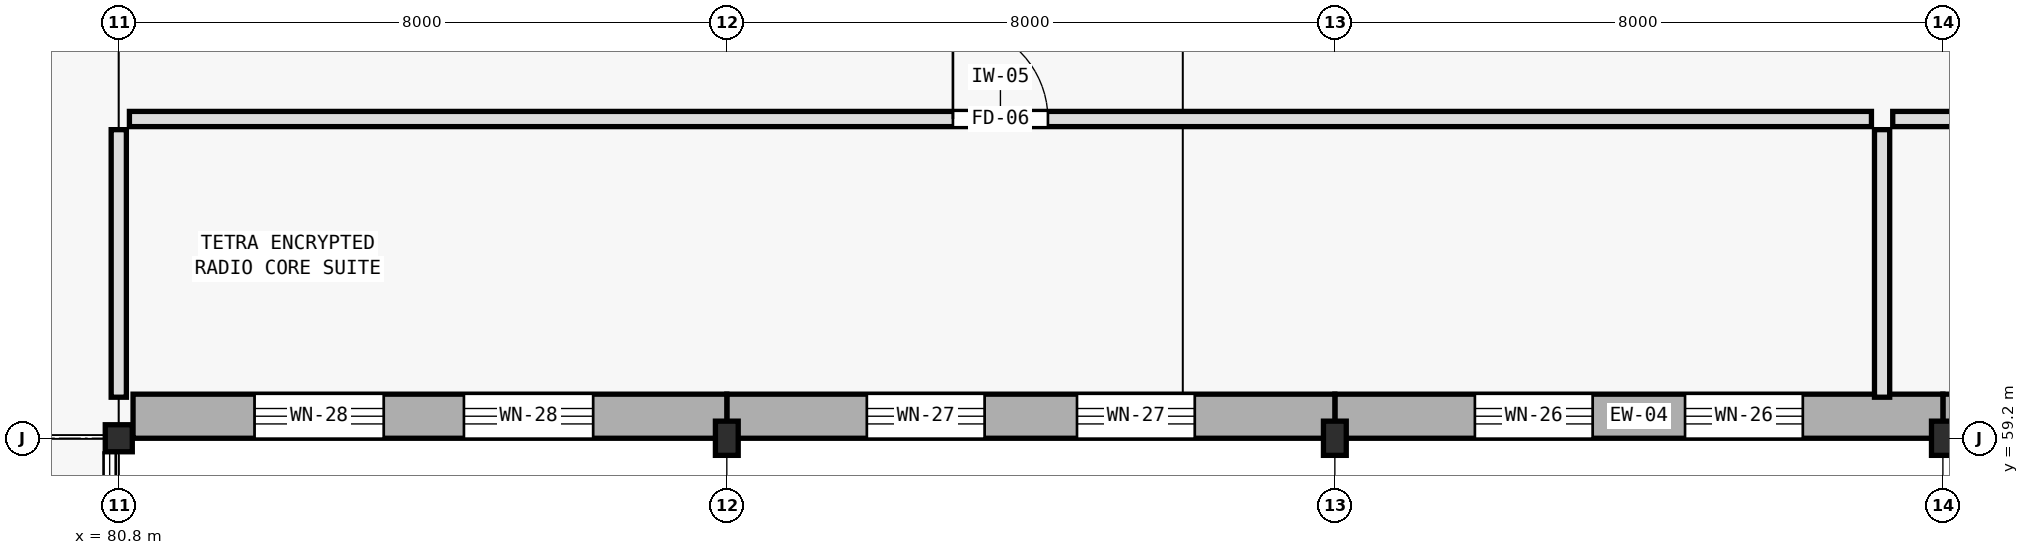
"""IFC4 building model, lengths in metres.
Left out: names, types, materials, properties, quantities, classifications, styles, units other than length and angle.
Written with IfcOpenShell. Run it as: python <this file> out.ifc"""

import sys

from ifc_helpers import new_model, si_unit, direction, frame, frame_2d, origin, origin_2d, place, context, subcontext, project, spatial, rectangle, hollow_circle, i_section, extrude, element, fill, save


model = new_model("IFC4")
c1 = context("Model", 3, precision=1e-05, world=origin(), true_north=direction((0.0, 1.0)))
c2 = subcontext(c1, "Body", "Model", "MODEL_VIEW")
j1 = project(units=[si_unit("LENGTHUNIT", "METRE"), si_unit("PLANEANGLEUNIT", "RADIAN")], contexts=[c1])
p1 = place(None, origin())
s1 = spatial("IfcSite", under=j1, at=p1, CompositionType="ELEMENT")
p2 = place(p1, origin())
s2 = spatial("IfcBuilding", under=s1, at=p2, CompositionType="ELEMENT")
p3 = place(p2, frame((0.0, 0.0, 9.9)))
s3 = spatial("IfcBuildingStorey", under=s2, at=p3, CompositionType="ELEMENT", Elevation=9.9)
p4 = place(p3, frame((80.8, 59.2, 0.0), z_axis=(0.0, 0.0, 1.0), x_axis=(1.0, 0.0, 0.0)))
e1 = element("IfcColumn", 1, at=p4, inside=s3, PredefinedType="COLUMN", context=c2, shape_type="SweptSolid", body=[
    extrude(hollow_circle(Radius=0.178, WallThickness=0.016, at=origin_2d()), origin(), (0.0, 0.0, 1.0), 4.2),
])
for number, where, z_axis, x_axis in (
    (2, (88.8, 59.2, 0.0), (0.0, 0.0, 1.0), (1.0, 0.0, 0.0)),
    (3, (96.8, 59.2, 0.0), (0.0, 0.0, 1.0), (1.0, 0.0, 0.0)),
    (4, (104.8, 59.2, 0.0), (0.0, 0.0, 1.0), (1.0, 0.0, 0.0)),
):
    element("IfcColumn", number, at=place(p3, frame(where, z_axis=z_axis, x_axis=x_axis)), inside=s3, PredefinedType="COLUMN", context=c2, shape_type="SweptSolid", body=[
        extrude(i_section(OverallWidth=0.3, OverallDepth=0.45, WebThickness=0.014, FlangeThickness=0.026, FilletRadius=0.027, at=origin_2d()), origin(), (0.0, 0.0, 1.0), 4.2),
    ])
p5 = place(p3, frame((112.8, 59.49, 0.0), z_axis=(0.0, 0.0, 1.0), x_axis=(-1.0, 0.0, 0.0)))
e5 = element("IfcWall", 5, at=p5, inside=s3, PredefinedType="STANDARD", context=c2, shape_type="SweptSolid", body=[
    extrude(rectangle(XDim=8.0, YDim=0.58, at=frame_2d((4.0, 0.0))), origin(), (0.0, 0.0, 1.0), 3.955),
])
p6 = place(p5, frame((1.917, 0.0, 0.9)))
e6 = element("IfcOpeningElement", 6, at=p6, cuts=e5, PredefinedType="OPENING", context=c2, shape_type="SweptSolid", body=[
    extrude(rectangle(XDim=1.4, YDim=2.15, at=frame_2d((0.7, 1.075))), frame((0.0, 0.3, 0.0), z_axis=(0.0, -1.0, 0.0), x_axis=(1.0, 0.0, 0.0)), (0.0, 0.0, 1.0), 0.6),
])
p7 = place(p5, frame((4.682, 0.0, 0.9)))
e7 = element("IfcOpeningElement", 7, at=p7, cuts=e5, PredefinedType="OPENING", context=c2, shape_type="SweptSolid", body=[
    extrude(rectangle(XDim=1.4, YDim=2.15, at=frame_2d((0.7, 1.075))), frame((0.0, 0.3, 0.0), z_axis=(0.0, -1.0, 0.0), x_axis=(1.0, 0.0, 0.0)), (0.0, 0.0, 1.0), 0.6),
])
p8 = place(p3, frame((104.8, 59.49, 0.0), z_axis=(0.0, 0.0, 1.0), x_axis=(-1.0, 0.0, 0.0)))
e8 = element("IfcWall", 8, at=p8, inside=s3, PredefinedType="STANDARD", context=c2, shape_type="SweptSolid", body=[
    extrude(rectangle(XDim=8.0, YDim=0.58, at=frame_2d((4.0, 0.0))), origin(), (0.0, 0.0, 1.0), 3.955),
])
p9 = place(p8, frame((1.843, 0.0, 0.9)))
e9 = element("IfcOpeningElement", 9, at=p9, cuts=e8, PredefinedType="OPENING", context=c2, shape_type="SweptSolid", body=[
    extrude(rectangle(XDim=1.55, YDim=1.85, at=frame_2d((0.775, 0.925))), frame((0.0, 0.3, 0.0), z_axis=(0.0, -1.0, 0.0), x_axis=(1.0, 0.0, 0.0)), (0.0, 0.0, 1.0), 0.6),
])
p10 = place(p8, frame((4.607, 0.0, 0.9)))
e10 = element("IfcOpeningElement", 10, at=p10, cuts=e8, PredefinedType="OPENING", context=c2, shape_type="SweptSolid", body=[
    extrude(rectangle(XDim=1.55, YDim=1.85, at=frame_2d((0.775, 0.925))), frame((0.0, 0.3, 0.0), z_axis=(0.0, -1.0, 0.0), x_axis=(1.0, 0.0, 0.0)), (0.0, 0.0, 1.0), 0.6),
])
p11 = place(p3, frame((96.8, 59.49, 0.0), z_axis=(0.0, 0.0, 1.0), x_axis=(-1.0, 0.0, 0.0)))
e11 = element("IfcWall", 11, at=p11, inside=s3, PredefinedType="STANDARD", context=c2, shape_type="SweptSolid", body=[
    extrude(rectangle(XDim=8.0, YDim=0.58, at=frame_2d((4.0, 0.0))), origin(), (0.0, 0.0, 1.0), 3.955),
])
p12 = place(p11, frame((1.843, 0.0, 0.9)))
e12 = element("IfcOpeningElement", 12, at=p12, cuts=e11, PredefinedType="OPENING", context=c2, shape_type="SweptSolid", body=[
    extrude(rectangle(XDim=1.55, YDim=2.25, at=frame_2d((0.775, 1.125))), frame((0.0, 0.3, 0.0), z_axis=(0.0, -1.0, 0.0), x_axis=(1.0, 0.0, 0.0)), (0.0, 0.0, 1.0), 0.6),
])
p13 = place(p11, frame((4.607, 0.0, 0.9)))
e13 = element("IfcOpeningElement", 13, at=p13, cuts=e11, PredefinedType="OPENING", context=c2, shape_type="SweptSolid", body=[
    extrude(rectangle(XDim=1.55, YDim=2.25, at=frame_2d((0.775, 1.125))), frame((0.0, 0.3, 0.0), z_axis=(0.0, -1.0, 0.0), x_axis=(1.0, 0.0, 0.0)), (0.0, 0.0, 1.0), 0.6),
])
p14 = place(p3, frame((88.8, 59.49, 0.0), z_axis=(0.0, 0.0, 1.0), x_axis=(-1.0, 0.0, 0.0)))
e14 = element("IfcWall", 14, at=p14, inside=s3, PredefinedType="STANDARD", context=c2, shape_type="SweptSolid", body=[
    extrude(rectangle(XDim=7.812, YDim=0.58, at=frame_2d((3.906, 0.0))), origin(), (0.0, 0.0, 1.0), 3.955),
])
p15 = place(p14, frame((1.759, 0.0, 0.9)))
e15 = element("IfcOpeningElement", 15, at=p15, cuts=e14, PredefinedType="OPENING", context=c2, shape_type="SweptSolid", body=[
    extrude(rectangle(XDim=1.7, YDim=2.0, at=frame_2d((0.85, 1.0))), frame((0.0, 0.3, 0.0), z_axis=(0.0, -1.0, 0.0), x_axis=(1.0, 0.0, 0.0)), (0.0, 0.0, 1.0), 0.6),
])
p16 = place(p14, frame((4.513, 0.0, 0.9)))
e16 = element("IfcOpeningElement", 16, at=p16, cuts=e14, PredefinedType="OPENING", context=c2, shape_type="SweptSolid", body=[
    extrude(rectangle(XDim=1.7, YDim=2.0, at=frame_2d((0.85, 1.0))), frame((0.0, 0.3, 0.0), z_axis=(0.0, -1.0, 0.0), x_axis=(1.0, 0.0, 0.0)), (0.0, 0.0, 1.0), 0.6),
])
p17 = place(p3, frame((80.94, 63.4, 0.0), z_axis=(0.0, 0.0, 1.0), x_axis=(1.0, 0.0, 0.0)))
e17 = element("IfcWall", 17, at=p17, inside=s3, PredefinedType="STANDARD", context=c2, shape_type="SweptSolid", body=[
    extrude(rectangle(XDim=22.92, YDim=0.2, at=frame_2d((11.46, 0.0))), origin(), (0.0, 0.0, 1.0), 3.41),
])
p18 = place(p17, frame((10.835, 0.0, 0.0)))
e18 = element("IfcOpeningElement", 18, at=p18, cuts=e17, PredefinedType="OPENING", context=c2, shape_type="SweptSolid", body=[
    extrude(rectangle(XDim=1.25, YDim=2.3, at=frame_2d((0.625, 1.15))), frame((0.0, 0.11, 0.0), z_axis=(0.0, -1.0, 0.0), x_axis=(1.0, 0.0, 0.0)), (0.0, 0.0, 1.0), 0.22),
])
p19 = place(p3, frame((80.8, 59.74, 0.0), z_axis=(0.0, 0.0, 1.0), x_axis=(0.0, 1.0, 0.0)))
e19 = element("IfcWall", 19, at=p19, inside=s3, PredefinedType="STANDARD", context=c2, shape_type="SweptSolid", body=[
    extrude(rectangle(XDim=3.52, YDim=0.2, at=frame_2d((1.76, 0.0))), origin(), (0.0, 0.0, 1.0), 3.41),
])
p20 = place(p3, frame((104.0, 59.74, 0.0), z_axis=(0.0, 0.0, 1.0), x_axis=(0.0, 1.0, 0.0)))
e20 = element("IfcWall", 20, at=p20, inside=s3, PredefinedType="STANDARD", context=c2, shape_type="SweptSolid", body=[
    extrude(rectangle(XDim=3.52, YDim=0.2, at=frame_2d((1.76, 0.0))), origin(), (0.0, 0.0, 1.0), 3.92),
])
p21 = place(p3, frame((104.14, 63.4, 0.0), z_axis=(0.0, 0.0, 1.0), x_axis=(1.0, 0.0, 0.0)))
e21 = element("IfcWall", 21, at=p21, inside=s3, PredefinedType="STANDARD", context=c2, shape_type="SweptSolid", body=[
    extrude(rectangle(XDim=32.12, YDim=0.2, at=frame_2d((16.06, 0.0))), origin(), (0.0, 0.0, 1.0), 3.445),
])
p22 = place(p21, frame((15.21, 0.0, 0.0)))
e22 = element("IfcOpeningElement", 22, at=p22, cuts=e21, PredefinedType="OPENING", context=c2, shape_type="SweptSolid", body=[
    extrude(rectangle(XDim=1.7, YDim=2.4, at=frame_2d((0.85, 1.2))), frame((0.0, 0.11, 0.0), z_axis=(0.0, -1.0, 0.0), x_axis=(1.0, 0.0, 0.0)), (0.0, 0.0, 1.0), 0.22),
])
p23 = place(p9, origin())
e23 = element("IfcWindow", 23, at=p23, inside=s3, PartitioningType="SINGLE_PANEL", PredefinedType="WINDOW", context=c2, shape_type="SweptSolid", body=[
    extrude(rectangle(XDim=1.55, YDim=1.85, at=frame_2d((0.775, 0.925))), frame((0.0, 0.03, 0.0), z_axis=(0.0, -1.0, 0.0), x_axis=(1.0, 0.0, 0.0)), (0.0, 0.0, 1.0), 0.06),
])
fill(e9, e23)
p24 = place(p10, origin())
e24 = element("IfcWindow", 24, at=p24, inside=s3, PartitioningType="SINGLE_PANEL", PredefinedType="WINDOW", context=c2, shape_type="SweptSolid", body=[
    extrude(rectangle(XDim=1.55, YDim=1.85, at=frame_2d((0.775, 0.925))), frame((0.0, 0.03, 0.0), z_axis=(0.0, -1.0, 0.0), x_axis=(1.0, 0.0, 0.0)), (0.0, 0.0, 1.0), 0.06),
])
fill(e10, e24)
p25 = place(p12, origin())
e25 = element("IfcWindow", 25, at=p25, inside=s3, PartitioningType="SINGLE_PANEL", PredefinedType="WINDOW", context=c2, shape_type="SweptSolid", body=[
    extrude(rectangle(XDim=1.55, YDim=2.25, at=frame_2d((0.775, 1.125))), frame((0.0, 0.03, 0.0), z_axis=(0.0, -1.0, 0.0), x_axis=(1.0, 0.0, 0.0)), (0.0, 0.0, 1.0), 0.06),
])
fill(e12, e25)
p26 = place(p13, origin())
e26 = element("IfcWindow", 26, at=p26, inside=s3, PartitioningType="SINGLE_PANEL", PredefinedType="WINDOW", context=c2, shape_type="SweptSolid", body=[
    extrude(rectangle(XDim=1.55, YDim=2.25, at=frame_2d((0.775, 1.125))), frame((0.0, 0.03, 0.0), z_axis=(0.0, -1.0, 0.0), x_axis=(1.0, 0.0, 0.0)), (0.0, 0.0, 1.0), 0.06),
])
fill(e13, e26)
p27 = place(p15, origin())
e27 = element("IfcWindow", 27, at=p27, inside=s3, PartitioningType="SINGLE_PANEL", PredefinedType="WINDOW", context=c2, shape_type="SweptSolid", body=[
    extrude(rectangle(XDim=1.7, YDim=2.0, at=frame_2d((0.85, 1.0))), frame((0.0, 0.03, 0.0), z_axis=(0.0, -1.0, 0.0), x_axis=(1.0, 0.0, 0.0)), (0.0, 0.0, 1.0), 0.06),
])
fill(e15, e27)
p28 = place(p16, origin())
e28 = element("IfcWindow", 28, at=p28, inside=s3, PartitioningType="SINGLE_PANEL", PredefinedType="WINDOW", context=c2, shape_type="SweptSolid", body=[
    extrude(rectangle(XDim=1.7, YDim=2.0, at=frame_2d((0.85, 1.0))), frame((0.0, 0.03, 0.0), z_axis=(0.0, -1.0, 0.0), x_axis=(1.0, 0.0, 0.0)), (0.0, 0.0, 1.0), 0.06),
])
fill(e16, e28)
p29 = place(p18, origin())
e29 = element("IfcDoor", 29, at=p29, inside=s3, OperationType="SINGLE_SWING_LEFT", PredefinedType="DOOR", context=c2, shape_type="SweptSolid", body=[
    extrude(rectangle(XDim=1.25, YDim=2.3, at=frame_2d((0.625, 1.15))), frame((0.0, 0.025, 0.0), z_axis=(0.0, -1.0, 0.0), x_axis=(1.0, 0.0, 0.0)), (0.0, 0.0, 1.0), 0.05),
])
fill(e18, e29)
save(model, sys.argv[1])
